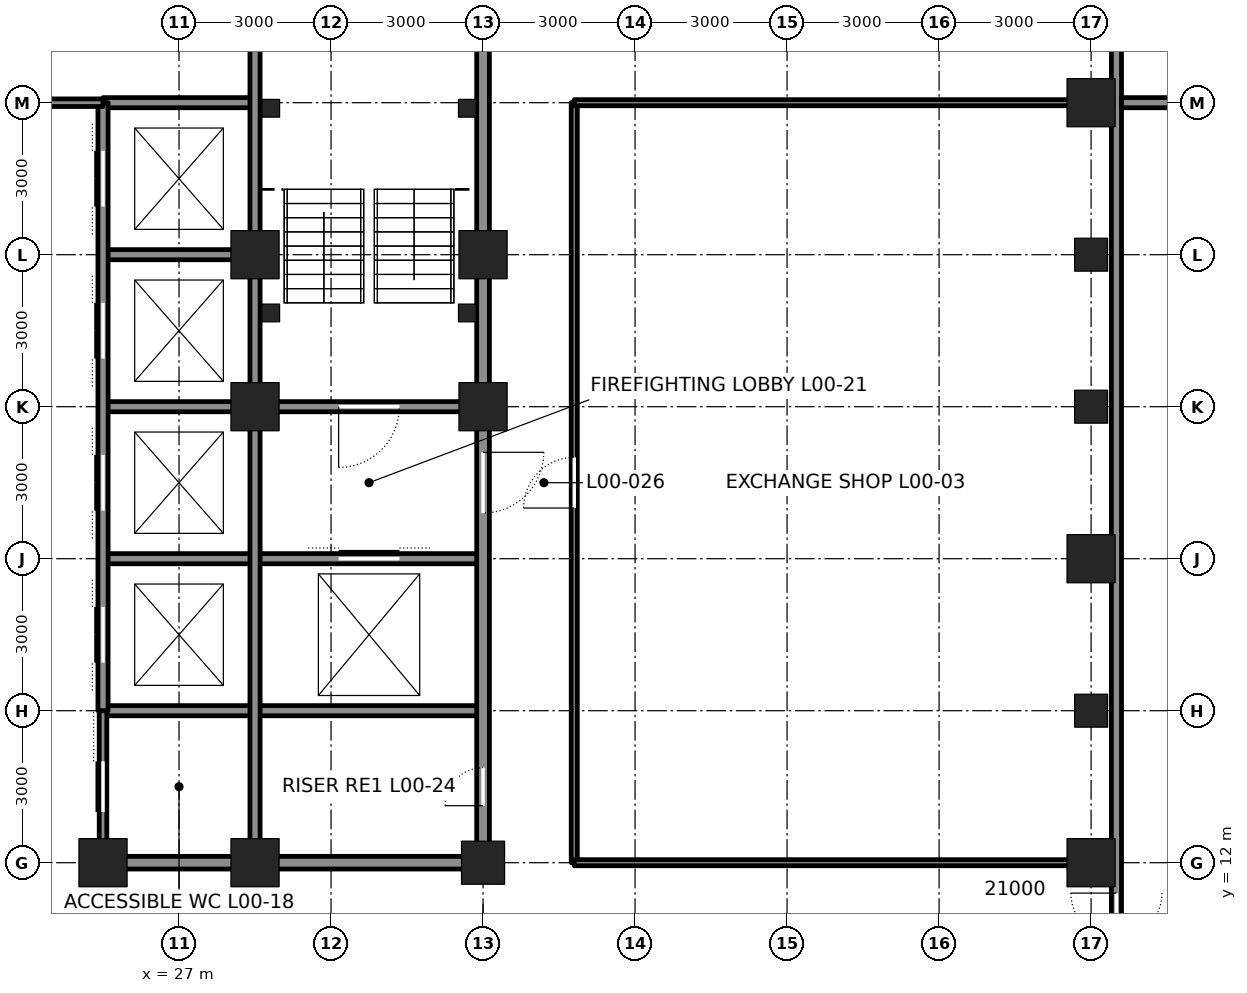
"""IFC4 building model, lengths in metres.
Left out: names, types, materials, properties, quantities, classifications, styles, units other than length and angle.
Written with IfcOpenShell. Run it as: python <this file> out.ifc"""

import sys

from ifc_helpers import new_model, si_unit, direction, frame, frame_2d, origin, origin_2d, place, context, subcontext, project, spatial, rectangle, hollow_rectangle, extrude, element, fill, save


model = new_model("IFC4")
c1 = context("Model", 3, precision=1e-05, world=origin(), true_north=direction((0.0, 1.0)))
c2 = subcontext(c1, "Body", "Model", "MODEL_VIEW")
j1 = project(units=[si_unit("LENGTHUNIT", "METRE"), si_unit("PLANEANGLEUNIT", "RADIAN")], contexts=[c1])
p1 = place(None, origin())
s1 = spatial("IfcSite", under=j1, at=p1, CompositionType="ELEMENT")
p2 = place(p1, origin())
s2 = spatial("IfcBuilding", under=s1, at=p2, CompositionType="ELEMENT")
p3 = place(p2, origin())
s3 = spatial("IfcBuildingStorey", under=s2, at=p3, CompositionType="ELEMENT", Elevation=0.0)
p4 = place(p3, frame((45.0, 12.0, 0.0), z_axis=(0.0, 0.0, 1.0), x_axis=(1.0, 0.0, 0.0)))
e1 = element("IfcColumn", 1, at=p4, inside=s3, PredefinedType="COLUMN", context=c2, shape_type="SweptSolid", body=[
    extrude(hollow_rectangle(XDim=0.95, YDim=0.95, WallThickness=0.11, at=origin_2d()), origin(), (0.0, 0.0, 1.0), 6.0),
])
p5 = place(p3, frame((45.0, 15.0, 0.0), z_axis=(0.0, 0.0, 1.0), x_axis=(1.0, 0.0, 0.0)))
e2 = element("IfcColumn", 2, at=p5, inside=s3, PredefinedType="COLUMN", context=c2, shape_type="SweptSolid", body=[
    extrude(hollow_rectangle(XDim=0.65, YDim=0.65, WallThickness=0.065, at=origin_2d()), origin(), (0.0, 0.0, 1.0), 6.0),
])
p6 = place(p3, frame((45.0, 18.0, 0.0), z_axis=(0.0, 0.0, 1.0), x_axis=(1.0, 0.0, 0.0)))
e3 = element("IfcColumn", 3, at=p6, inside=s3, PredefinedType="COLUMN", context=c2, shape_type="SweptSolid", body=[
    extrude(hollow_rectangle(XDim=0.95, YDim=0.95, WallThickness=0.11, at=origin_2d()), origin(), (0.0, 0.0, 1.0), 6.0),
])
for number, where, z_axis, x_axis in (
    (4, (45.0, 21.0, 0.0), (0.0, 0.0, 1.0), (1.0, 0.0, 0.0)),
    (5, (45.0, 24.0, 0.0), (0.0, 0.0, 1.0), (1.0, 0.0, 0.0)),
):
    element("IfcColumn", number, at=place(p3, frame(where, z_axis=z_axis, x_axis=x_axis)), inside=s3, PredefinedType="COLUMN", context=c2, shape_type="SweptSolid", body=[
        extrude(hollow_rectangle(XDim=0.65, YDim=0.65, WallThickness=0.065, at=origin_2d()), origin(), (0.0, 0.0, 1.0), 6.0),
    ])
p7 = place(p3, frame((45.0, 27.0, 0.0), z_axis=(0.0, 0.0, 1.0), x_axis=(1.0, 0.0, 0.0)))
e6 = element("IfcColumn", 6, at=p7, inside=s3, PredefinedType="COLUMN", context=c2, shape_type="SweptSolid", body=[
    extrude(hollow_rectangle(XDim=0.95, YDim=0.95, WallThickness=0.11, at=origin_2d()), origin(), (0.0, 0.0, 1.0), 6.0),
])
for number, where, z_axis, x_axis in (
    (7, (25.5, 12.0, 0.0), (0.0, 0.0, 1.0), (1.0, 0.0, 0.0)),
    (8, (28.5, 12.0, 0.0), (0.0, 0.0, 1.0), (1.0, 0.0, 0.0)),
):
    element("IfcColumn", number, at=place(p3, frame(where, z_axis=z_axis, x_axis=x_axis)), inside=s3, PredefinedType="COLUMN", context=c2, shape_type="SweptSolid", body=[
        extrude(hollow_rectangle(XDim=0.95, YDim=0.95, WallThickness=0.095, at=origin_2d()), origin(), (0.0, 0.0, 1.0), 6.0),
    ])
p8 = place(p3, frame((33.0, 12.0, 0.0), z_axis=(0.0, 0.0, 1.0), x_axis=(1.0, 0.0, 0.0)))
e9 = element("IfcColumn", 9, at=p8, inside=s3, PredefinedType="COLUMN", context=c2, shape_type="SweptSolid", body=[
    extrude(hollow_rectangle(XDim=0.85, YDim=0.85, WallThickness=0.085, at=origin_2d()), origin(), (0.0, 0.0, 1.0), 6.0),
])
for number, where, z_axis, x_axis in (
    (10, (33.0, 21.0, 0.0), (0.0, 0.0, 1.0), (1.0, 0.0, 0.0)),
    (11, (33.0, 24.0, 0.0), (0.0, 0.0, 1.0), (1.0, 0.0, 0.0)),
    (12, (28.5, 21.0, 0.0), (0.0, 0.0, 1.0), (1.0, 0.0, 0.0)),
    (13, (28.5, 24.0, 0.0), (0.0, 0.0, 1.0), (1.0, 0.0, 0.0)),
):
    element("IfcColumn", number, at=place(p3, frame(where, z_axis=z_axis, x_axis=x_axis)), inside=s3, PredefinedType="COLUMN", context=c2, shape_type="SweptSolid", body=[
        extrude(hollow_rectangle(XDim=0.95, YDim=0.95, WallThickness=0.095, at=origin_2d()), origin(), (0.0, 0.0, 1.0), 6.0),
    ])
p9 = place(p3, frame((25.75, 12.0, 0.0), z_axis=(0.0, 0.0, 1.0), x_axis=(1.0, 0.0, 0.0)))
e14 = element("IfcWall", 14, at=p9, inside=s3, PredefinedType="SOLIDWALL", context=c2, shape_type="SweptSolid", body=[
    extrude(rectangle(XDim=2.5, YDim=0.25, at=frame_2d((1.25, 0.0))), origin(), (0.0, 0.0, 1.0), 4.941),
])
p10 = place(p3, frame((28.75, 12.0, 0.0), z_axis=(0.0, 0.0, 1.0), x_axis=(1.0, 0.0, 0.0)))
e15 = element("IfcWall", 15, at=p10, inside=s3, PredefinedType="SOLIDWALL", context=c2, shape_type="SweptSolid", body=[
    extrude(rectangle(XDim=4.0, YDim=0.25, at=frame_2d((2.0, 0.0))), origin(), (0.0, 0.0, 1.0), 4.941),
])
p11 = place(p3, frame((25.5, 15.0, 0.0), z_axis=(0.0, 0.0, 1.0), x_axis=(1.0, 0.0, 0.0)))
e16 = element("IfcWall", 16, at=p11, inside=s3, PredefinedType="SOLIDWALL", context=c2, shape_type="SweptSolid", body=[
    extrude(rectangle(XDim=7.5, YDim=0.2, at=frame_2d((3.75, 0.0))), origin(), (0.0, 0.0, 1.0), 5.8),
])
p12 = place(p3, frame((25.5, 24.0, 0.0), z_axis=(0.0, 0.0, 1.0), x_axis=(1.0, 0.0, 0.0)))
e17 = element("IfcWall", 17, at=p12, inside=s3, PredefinedType="SOLIDWALL", context=c2, shape_type="SweptSolid", body=[
    extrude(rectangle(XDim=2.75, YDim=0.2, at=frame_2d((1.375, 0.0))), origin(), (0.0, 0.0, 1.0), 4.85),
])
p13 = place(p3, frame((25.5, 27.0, 0.0), z_axis=(0.0, 0.0, 1.0), x_axis=(1.0, 0.0, 0.0)))
e18 = element("IfcWall", 18, at=p13, inside=s3, PredefinedType="SOLIDWALL", context=c2, shape_type="SweptSolid", body=[
    extrude(rectangle(XDim=3.0, YDim=0.2, at=frame_2d((1.5, 0.0))), origin(), (0.0, 0.0, 1.0), 5.8),
])
p14 = place(p3, frame((25.5, 18.0, 0.0), z_axis=(0.0, 0.0, 1.0), x_axis=(1.0, 0.0, 0.0)))
e19 = element("IfcWall", 19, at=p14, inside=s3, PredefinedType="SOLIDWALL", context=c2, shape_type="SweptSolid", body=[
    extrude(rectangle(XDim=7.5, YDim=0.2, at=frame_2d((3.75, 0.0))), origin(), (0.0, 0.0, 1.0), 5.8),
])
p15 = place(p14, frame((4.65, 0.0, 0.0)))
e20 = element("IfcOpeningElement", 20, at=p15, cuts=e19, PredefinedType="OPENING", context=c2, shape_type="SweptSolid", body=[
    extrude(rectangle(XDim=1.2, YDim=2.1, at=frame_2d((0.6, 1.05))), frame((0.0, 0.11, 0.0), z_axis=(0.0, -1.0, 0.0), x_axis=(1.0, 0.0, 0.0)), (0.0, 0.0, 1.0), 0.22),
])
p16 = place(p3, frame((25.5, 21.0, 0.0), z_axis=(0.0, 0.0, 1.0), x_axis=(1.0, 0.0, 0.0)))
e21 = element("IfcWall", 21, at=p16, inside=s3, PredefinedType="SOLIDWALL", context=c2, shape_type="SweptSolid", body=[
    extrude(rectangle(XDim=2.75, YDim=0.2, at=frame_2d((1.375, 0.0))), origin(), (0.0, 0.0, 1.0), 4.85),
])
p17 = place(p3, frame((28.75, 21.0, 0.0), z_axis=(0.0, 0.0, 1.0), x_axis=(1.0, 0.0, 0.0)))
e22 = element("IfcWall", 22, at=p17, inside=s3, PredefinedType="SOLIDWALL", context=c2, shape_type="SweptSolid", body=[
    extrude(rectangle(XDim=4.0, YDim=0.2, at=frame_2d((2.0, 0.0))), origin(), (0.0, 0.0, 1.0), 4.85),
])
p18 = place(p17, frame((1.4, 0.0, 0.0)))
e23 = element("IfcOpeningElement", 23, at=p18, cuts=e22, PredefinedType="OPENING", context=c2, shape_type="SweptSolid", body=[
    extrude(rectangle(XDim=1.2, YDim=2.1, at=frame_2d((0.6, 1.05))), frame((0.0, 0.11, 0.0), z_axis=(0.0, -1.0, 0.0), x_axis=(1.0, 0.0, 0.0)), (0.0, 0.0, 1.0), 0.22),
])
p19 = place(p3, frame((25.5, 12.25, 0.0), z_axis=(0.0, 0.0, 1.0), x_axis=(0.0, 1.0, 0.0)))
e24 = element("IfcWall", 24, at=p19, inside=s3, PredefinedType="PARTITIONING", context=c2, shape_type="SweptSolid", body=[
    extrude(rectangle(XDim=2.75, YDim=0.15, at=frame_2d((1.375, 0.0))), origin(), (0.0, 0.0, 1.0), 4.825),
])
p20 = place(p19, frame((0.75, 0.0, 0.0)))
e25 = element("IfcOpeningElement", 25, at=p20, cuts=e24, PredefinedType="OPENING", context=c2, shape_type="SweptSolid", body=[
    extrude(rectangle(XDim=1.0, YDim=2.1, at=frame_2d((0.5, 1.05))), frame((0.0, 0.085, 0.0), z_axis=(0.0, -1.0, 0.0), x_axis=(1.0, 0.0, 0.0)), (0.0, 0.0, 1.0), 0.17),
])
p21 = place(p3, frame((25.5, 15.0, 0.0), z_axis=(0.0, 0.0, 1.0), x_axis=(0.0, 1.0, 0.0)))
e26 = element("IfcWall", 26, at=p21, inside=s3, PredefinedType="SOLIDWALL", context=c2, shape_type="SweptSolid", body=[
    extrude(rectangle(XDim=12.0, YDim=0.2, at=frame_2d((6.0, 0.0))), origin(), (0.0, 0.0, 1.0), 4.825),
])
p22 = place(p21, frame((0.95, 0.0, 0.0)))
e27 = element("IfcOpeningElement", 27, at=p22, cuts=e26, PredefinedType="OPENING", context=c2, shape_type="SweptSolid", body=[
    extrude(rectangle(XDim=1.1, YDim=2.1, at=frame_2d((0.55, 1.05))), frame((0.0, 0.11, 0.0), z_axis=(0.0, -1.0, 0.0), x_axis=(1.0, 0.0, 0.0)), (0.0, 0.0, 1.0), 0.22),
])
p23 = place(p21, frame((3.95, 0.0, 0.0)))
e28 = element("IfcOpeningElement", 28, at=p23, cuts=e26, PredefinedType="OPENING", context=c2, shape_type="SweptSolid", body=[
    extrude(rectangle(XDim=1.1, YDim=2.1, at=frame_2d((0.55, 1.05))), frame((0.0, 0.11, 0.0), z_axis=(0.0, -1.0, 0.0), x_axis=(1.0, 0.0, 0.0)), (0.0, 0.0, 1.0), 0.22),
])
p24 = place(p21, frame((6.95, 0.0, 0.0)))
e29 = element("IfcOpeningElement", 29, at=p24, cuts=e26, PredefinedType="OPENING", context=c2, shape_type="SweptSolid", body=[
    extrude(rectangle(XDim=1.1, YDim=2.1, at=frame_2d((0.55, 1.05))), frame((0.0, 0.11, 0.0), z_axis=(0.0, -1.0, 0.0), x_axis=(1.0, 0.0, 0.0)), (0.0, 0.0, 1.0), 0.22),
])
p25 = place(p21, frame((9.95, 0.0, 0.0)))
e30 = element("IfcOpeningElement", 30, at=p25, cuts=e26, PredefinedType="OPENING", context=c2, shape_type="SweptSolid", body=[
    extrude(rectangle(XDim=1.1, YDim=2.1, at=frame_2d((0.55, 1.05))), frame((0.0, 0.11, 0.0), z_axis=(0.0, -1.0, 0.0), x_axis=(1.0, 0.0, 0.0)), (0.0, 0.0, 1.0), 0.22),
])
p26 = place(p3, frame((28.5, 12.25, 0.0), z_axis=(0.0, 0.0, 1.0), x_axis=(0.0, 1.0, 0.0)))
e31 = element("IfcWall", 31, at=p26, inside=s3, PredefinedType="SOLIDWALL", context=c2, shape_type="SweptSolid", body=[
    extrude(rectangle(XDim=8.5, YDim=0.2, at=frame_2d((4.25, 0.0))), origin(), (0.0, 0.0, 1.0), 4.873),
])
p27 = place(p3, frame((28.5, 21.25, 0.0), z_axis=(0.0, 0.0, 1.0), x_axis=(0.0, 1.0, 0.0)))
e32 = element("IfcWall", 32, at=p27, inside=s3, PredefinedType="SOLIDWALL", context=c2, shape_type="SweptSolid", body=[
    extrude(rectangle(XDim=2.5, YDim=0.2, at=frame_2d((1.25, 0.0))), origin(), (0.0, 0.0, 1.0), 4.873),
])
p28 = place(p3, frame((28.5, 24.25, 0.0), z_axis=(0.0, 0.0, 1.0), x_axis=(0.0, 1.0, 0.0)))
e33 = element("IfcWall", 33, at=p28, inside=s3, PredefinedType="SOLIDWALL", context=c2, shape_type="SweptSolid", body=[
    extrude(rectangle(XDim=8.5, YDim=0.2, at=frame_2d((4.25, 0.0))), origin(), (0.0, 0.0, 1.0), 4.873),
])
p29 = place(p3, frame((33.0, 12.25, 0.0), z_axis=(0.0, 0.0, 1.0), x_axis=(0.0, 1.0, 0.0)))
e34 = element("IfcWall", 34, at=p29, inside=s3, PredefinedType="SOLIDWALL", context=c2, shape_type="SweptSolid", body=[
    extrude(rectangle(XDim=8.5, YDim=0.25, at=frame_2d((4.25, 0.0))), origin(), (0.0, 0.0, 1.0), 4.873),
])
p30 = place(p29, frame((6.65, 0.0, 0.0)))
e35 = element("IfcOpeningElement", 35, at=p30, cuts=e34, PredefinedType="OPENING", context=c2, shape_type="SweptSolid", body=[
    extrude(rectangle(XDim=1.2, YDim=2.1, at=frame_2d((0.6, 1.05))), frame((0.0, 0.135, 0.0), z_axis=(0.0, -1.0, 0.0), x_axis=(1.0, 0.0, 0.0)), (0.0, 0.0, 1.0), 0.27),
])
p31 = place(p29, frame((0.875, 0.0, 0.0)))
e36 = element("IfcOpeningElement", 36, at=p31, cuts=e34, PredefinedType="OPENING", context=c2, shape_type="SweptSolid", body=[
    extrude(rectangle(XDim=0.75, YDim=2.1, at=frame_2d((0.375, 1.05))), frame((0.0, 0.135, 0.0), z_axis=(0.0, -1.0, 0.0), x_axis=(1.0, 0.0, 0.0)), (0.0, 0.0, 1.0), 0.27),
])
p32 = place(p3, frame((33.0, 21.25, 0.0), z_axis=(0.0, 0.0, 1.0), x_axis=(0.0, 1.0, 0.0)))
e37 = element("IfcWall", 37, at=p32, inside=s3, PredefinedType="SOLIDWALL", context=c2, shape_type="SweptSolid", body=[
    extrude(rectangle(XDim=2.5, YDim=0.25, at=frame_2d((1.25, 0.0))), origin(), (0.0, 0.0, 1.0), 4.873),
])
p33 = place(p3, frame((33.0, 24.25, 0.0), z_axis=(0.0, 0.0, 1.0), x_axis=(0.0, 1.0, 0.0)))
e38 = element("IfcWall", 38, at=p33, inside=s3, PredefinedType="SOLIDWALL", context=c2, shape_type="SweptSolid", body=[
    extrude(rectangle(XDim=8.5, YDim=0.25, at=frame_2d((4.25, 0.0))), origin(), (0.0, 0.0, 1.0), 4.873),
])
p34 = place(p33, frame((6.875, 0.0, 0.0)))
e39 = element("IfcOpeningElement", 39, at=p34, cuts=e38, PredefinedType="OPENING", context=c2, shape_type="SweptSolid", body=[
    extrude(rectangle(XDim=0.75, YDim=2.1, at=frame_2d((0.375, 1.05))), frame((0.0, 0.135, 0.0), z_axis=(0.0, -1.0, 0.0), x_axis=(1.0, 0.0, 0.0)), (0.0, 0.0, 1.0), 0.27),
])
p35 = place(p3, frame((19.5, 27.0, 0.0), z_axis=(0.0, 0.0, 1.0), x_axis=(1.0, 0.0, 0.0)))
e40 = element("IfcWall", 40, at=p35, inside=s3, PredefinedType="PARTITIONING", context=c2, shape_type="SweptSolid", body=[
    extrude(rectangle(XDim=6.0, YDim=0.15, at=frame_2d((3.0, 0.0))), origin(), (0.0, 0.0, 1.0), 5.8),
])
p36 = place(p35, frame((1.05, 0.0, 0.0)))
e41 = element("IfcOpeningElement", 41, at=p36, cuts=e40, PredefinedType="OPENING", context=c2, shape_type="SweptSolid", body=[
    extrude(rectangle(XDim=0.9, YDim=2.1, at=frame_2d((0.45, 1.05))), frame((0.0, 0.085, 0.0), z_axis=(0.0, -1.0, 0.0), x_axis=(1.0, 0.0, 0.0)), (0.0, 0.0, 1.0), 0.17),
])
p37 = place(p35, frame((4.05, 0.0, 0.0)))
e42 = element("IfcOpeningElement", 42, at=p37, cuts=e40, PredefinedType="OPENING", context=c2, shape_type="SweptSolid", body=[
    extrude(rectangle(XDim=0.9, YDim=2.1, at=frame_2d((0.45, 1.05))), frame((0.0, 0.085, 0.0), z_axis=(0.0, -1.0, 0.0), x_axis=(1.0, 0.0, 0.0)), (0.0, 0.0, 1.0), 0.17),
])
p38 = place(p3, frame((34.8, 12.0, 0.0), z_axis=(0.0, 0.0, 1.0), x_axis=(0.0, 1.0, 0.0)))
e43 = element("IfcWall", 43, at=p38, inside=s3, PredefinedType="PARTITIONING", context=c2, shape_type="SweptSolid", body=[
    extrude(rectangle(XDim=15.0, YDim=0.12, at=frame_2d((7.5, 0.0))), origin(), (0.0, 0.0, 1.0), 5.8),
])
p39 = place(p38, frame((7.0, 0.0, 0.0)))
e44 = element("IfcOpeningElement", 44, at=p39, cuts=e43, PredefinedType="OPENING", context=c2, shape_type="SweptSolid", body=[
    extrude(rectangle(XDim=1.0, YDim=2.4, at=frame_2d((0.5, 1.2))), frame((0.0, 0.07, 0.0), z_axis=(0.0, -1.0, 0.0), x_axis=(1.0, 0.0, 0.0)), (0.0, 0.0, 1.0), 0.14),
])
p40 = place(p3, frame((34.8, 12.0, 0.0), z_axis=(0.0, 0.0, 1.0), x_axis=(1.0, 0.0, 0.0)))
e45 = element("IfcWall", 45, at=p40, inside=s3, PredefinedType="PARTITIONING", context=c2, shape_type="SweptSolid", body=[
    extrude(rectangle(XDim=10.7, YDim=0.12, at=frame_2d((5.35, 0.0))), origin(), (0.0, 0.0, 1.0), 4.941),
])
p41 = place(p3, frame((34.8, 27.0, 0.0), z_axis=(0.0, 0.0, 1.0), x_axis=(1.0, 0.0, 0.0)))
e46 = element("IfcWall", 46, at=p41, inside=s3, PredefinedType="PARTITIONING", context=c2, shape_type="SweptSolid", body=[
    extrude(rectangle(XDim=10.7, YDim=0.12, at=frame_2d((5.35, 0.0))), origin(), (0.0, 0.0, 1.0), 4.853),
])
p42 = place(p3, frame((45.5, -0.5, 0.0), z_axis=(0.0, 0.0, 1.0), x_axis=(0.0, 1.0, 0.0)))
e47 = element("IfcWall", 47, at=p42, inside=s3, PredefinedType="PARTITIONING", context=c2, shape_type="SweptSolid", body=[
    extrude(rectangle(XDim=45.98, YDim=0.2, at=frame_2d((22.99, 0.0))), origin(), (0.0, 0.0, 1.0), 5.8),
])
p43 = place(p42, frame((10.1, 0.0, 0.0)))
e48 = element("IfcOpeningElement", 48, at=p43, cuts=e47, PredefinedType="OPENING", context=c2, shape_type="SweptSolid", body=[
    extrude(rectangle(XDim=1.8, YDim=2.4, at=frame_2d((0.9, 1.2))), frame((0.0, 0.11, 0.0), z_axis=(0.0, -1.0, 0.0), x_axis=(1.0, 0.0, 0.0)), (0.0, 0.0, 1.0), 0.22),
])
p44 = place(p42, frame((31.1, 0.0, 0.0)))
e49 = element("IfcOpeningElement", 49, at=p44, cuts=e47, PredefinedType="OPENING", context=c2, shape_type="SweptSolid", body=[
    extrude(rectangle(XDim=1.8, YDim=2.4, at=frame_2d((0.9, 1.2))), frame((0.0, 0.11, 0.0), z_axis=(0.0, -1.0, 0.0), x_axis=(1.0, 0.0, 0.0)), (0.0, 0.0, 1.0), 0.22),
])
p45 = place(p3, frame((45.6, 27.0, 0.0), z_axis=(0.0, 0.0, 1.0), x_axis=(1.0, 0.0, 0.0)))
e50 = element("IfcWall", 50, at=p45, inside=s3, PredefinedType="PARTITIONING", context=c2, shape_type="SweptSolid", body=[
    extrude(rectangle(XDim=8.1, YDim=0.2, at=frame_2d((4.05, 0.0))), origin(), (0.0, 0.0, 1.0), 4.853),
])
for number, where, z_axis, x_axis in (
    (51, (28.81, 26.89, 0.0), (0.0, 0.0, 1.0), (1.0, 0.0, 0.0)),
    (52, (32.69, 26.89, 0.0), (0.0, 0.0, 1.0), (1.0, 0.0, 0.0)),
    (53, (28.81, 22.85, 0.0), (0.0, 0.0, 1.0), (1.0, 0.0, 0.0)),
    (54, (32.69, 22.85, 0.0), (0.0, 0.0, 1.0), (1.0, 0.0, 0.0)),
):
    element("IfcColumn", number, at=place(p3, frame(where, z_axis=z_axis, x_axis=x_axis)), inside=s3, PredefinedType="COLUMN", context=c2, shape_type="SweptSolid", body=[
        extrude(hollow_rectangle(XDim=0.35, YDim=0.35, WallThickness=0.035, at=origin_2d()), origin(), (0.0, 0.0, 1.0), 6.0),
    ])
p46 = place(p18, frame((1.2, 0.0, 0.0), z_axis=(0.0, 0.0, 1.0), x_axis=(-1.0, 0.0, 0.0)))
e55 = element("IfcDoor", 55, at=p46, inside=s3, OperationType="SINGLE_SWING_RIGHT", PredefinedType="DOOR", context=c2, shape_type="SweptSolid", body=[
    extrude(rectangle(XDim=1.2, YDim=2.1, at=frame_2d((0.6, 1.05))), frame((0.0, 0.025, 0.0), z_axis=(0.0, -1.0, 0.0), x_axis=(1.0, 0.0, 0.0)), (0.0, 0.0, 1.0), 0.05),
])
fill(e23, e55)
p47 = place(p30, frame((1.2, 0.0, 0.0), z_axis=(0.0, 0.0, 1.0), x_axis=(-1.0, 0.0, 0.0)))
e56 = element("IfcDoor", 56, at=p47, inside=s3, OperationType="SINGLE_SWING_LEFT", PredefinedType="DOOR", context=c2, shape_type="SweptSolid", body=[
    extrude(rectangle(XDim=1.2, YDim=2.1, at=frame_2d((0.6, 1.05))), frame((0.0, 0.025, 0.0), z_axis=(0.0, -1.0, 0.0), x_axis=(1.0, 0.0, 0.0)), (0.0, 0.0, 1.0), 0.05),
])
fill(e35, e56)
p48 = place(p15, origin())
e57 = element("IfcDoor", 57, at=p48, inside=s3, OperationType="DOUBLE_DOOR_SLIDING", PredefinedType="DOOR", context=c2, shape_type="SweptSolid", body=[
    extrude(rectangle(XDim=1.2, YDim=2.1, at=frame_2d((0.6, 1.05))), frame((0.0, 0.025, 0.0), z_axis=(0.0, -1.0, 0.0), x_axis=(1.0, 0.0, 0.0)), (0.0, 0.0, 1.0), 0.05),
])
fill(e20, e57)
p49 = place(p31, origin())
e58 = element("IfcDoor", 58, at=p49, inside=s3, OperationType="SINGLE_SWING_LEFT", PredefinedType="DOOR", context=c2, shape_type="SweptSolid", body=[
    extrude(rectangle(XDim=0.75, YDim=2.1, at=frame_2d((0.375, 1.05))), frame((0.0, 0.025, 0.0), z_axis=(0.0, -1.0, 0.0), x_axis=(1.0, 0.0, 0.0)), (0.0, 0.0, 1.0), 0.05),
])
fill(e36, e58)
p50 = place(p20, origin())
e59 = element("IfcDoor", 59, at=p50, inside=s3, OperationType="SLIDING_TO_LEFT", PredefinedType="DOOR", context=c2, shape_type="SweptSolid", body=[
    extrude(rectangle(XDim=1.0, YDim=2.1, at=frame_2d((0.5, 1.05))), frame((0.0, 0.025, 0.0), z_axis=(0.0, -1.0, 0.0), x_axis=(1.0, 0.0, 0.0)), (0.0, 0.0, 1.0), 0.05),
])
fill(e25, e59)
p51 = place(p22, origin())
e60 = element("IfcDoor", 60, at=p51, inside=s3, OperationType="DOUBLE_DOOR_SLIDING", PredefinedType="DOOR", context=c2, shape_type="SweptSolid", body=[
    extrude(rectangle(XDim=1.1, YDim=2.1, at=frame_2d((0.55, 1.05))), frame((0.0, 0.025, 0.0), z_axis=(0.0, -1.0, 0.0), x_axis=(1.0, 0.0, 0.0)), (0.0, 0.0, 1.0), 0.05),
])
fill(e27, e60)
p52 = place(p23, origin())
e61 = element("IfcDoor", 61, at=p52, inside=s3, OperationType="DOUBLE_DOOR_SLIDING", PredefinedType="DOOR", context=c2, shape_type="SweptSolid", body=[
    extrude(rectangle(XDim=1.1, YDim=2.1, at=frame_2d((0.55, 1.05))), frame((0.0, 0.025, 0.0), z_axis=(0.0, -1.0, 0.0), x_axis=(1.0, 0.0, 0.0)), (0.0, 0.0, 1.0), 0.05),
])
fill(e28, e61)
p53 = place(p24, origin())
e62 = element("IfcDoor", 62, at=p53, inside=s3, OperationType="DOUBLE_DOOR_SLIDING", PredefinedType="DOOR", context=c2, shape_type="SweptSolid", body=[
    extrude(rectangle(XDim=1.1, YDim=2.1, at=frame_2d((0.55, 1.05))), frame((0.0, 0.025, 0.0), z_axis=(0.0, -1.0, 0.0), x_axis=(1.0, 0.0, 0.0)), (0.0, 0.0, 1.0), 0.05),
])
fill(e29, e62)
p54 = place(p25, origin())
e63 = element("IfcDoor", 63, at=p54, inside=s3, OperationType="DOUBLE_DOOR_SLIDING", PredefinedType="DOOR", context=c2, shape_type="SweptSolid", body=[
    extrude(rectangle(XDim=1.1, YDim=2.1, at=frame_2d((0.55, 1.05))), frame((0.0, 0.025, 0.0), z_axis=(0.0, -1.0, 0.0), x_axis=(1.0, 0.0, 0.0)), (0.0, 0.0, 1.0), 0.05),
])
fill(e30, e63)
p55 = place(p39, origin())
e64 = element("IfcDoor", 64, at=p55, inside=s3, OperationType="SINGLE_SWING_LEFT", PredefinedType="DOOR", context=c2, shape_type="SweptSolid", body=[
    extrude(rectangle(XDim=1.0, YDim=2.4, at=frame_2d((0.5, 1.2))), frame((0.0, 0.025, 0.0), z_axis=(0.0, -1.0, 0.0), x_axis=(1.0, 0.0, 0.0)), (0.0, 0.0, 1.0), 0.05),
])
fill(e44, e64)
p56 = place(p43, origin())
e65 = element("IfcDoor", 65, at=p56, inside=s3, OperationType="DOUBLE_DOOR_DOUBLE_SWING", PredefinedType="DOOR", context=c2, shape_type="SweptSolid", body=[
    extrude(rectangle(XDim=1.8, YDim=2.4, at=frame_2d((0.9, 1.2))), frame((0.0, 0.025, 0.0), z_axis=(0.0, -1.0, 0.0), x_axis=(1.0, 0.0, 0.0)), (0.0, 0.0, 1.0), 0.05),
])
fill(e48, e65)
save(model, sys.argv[1])
